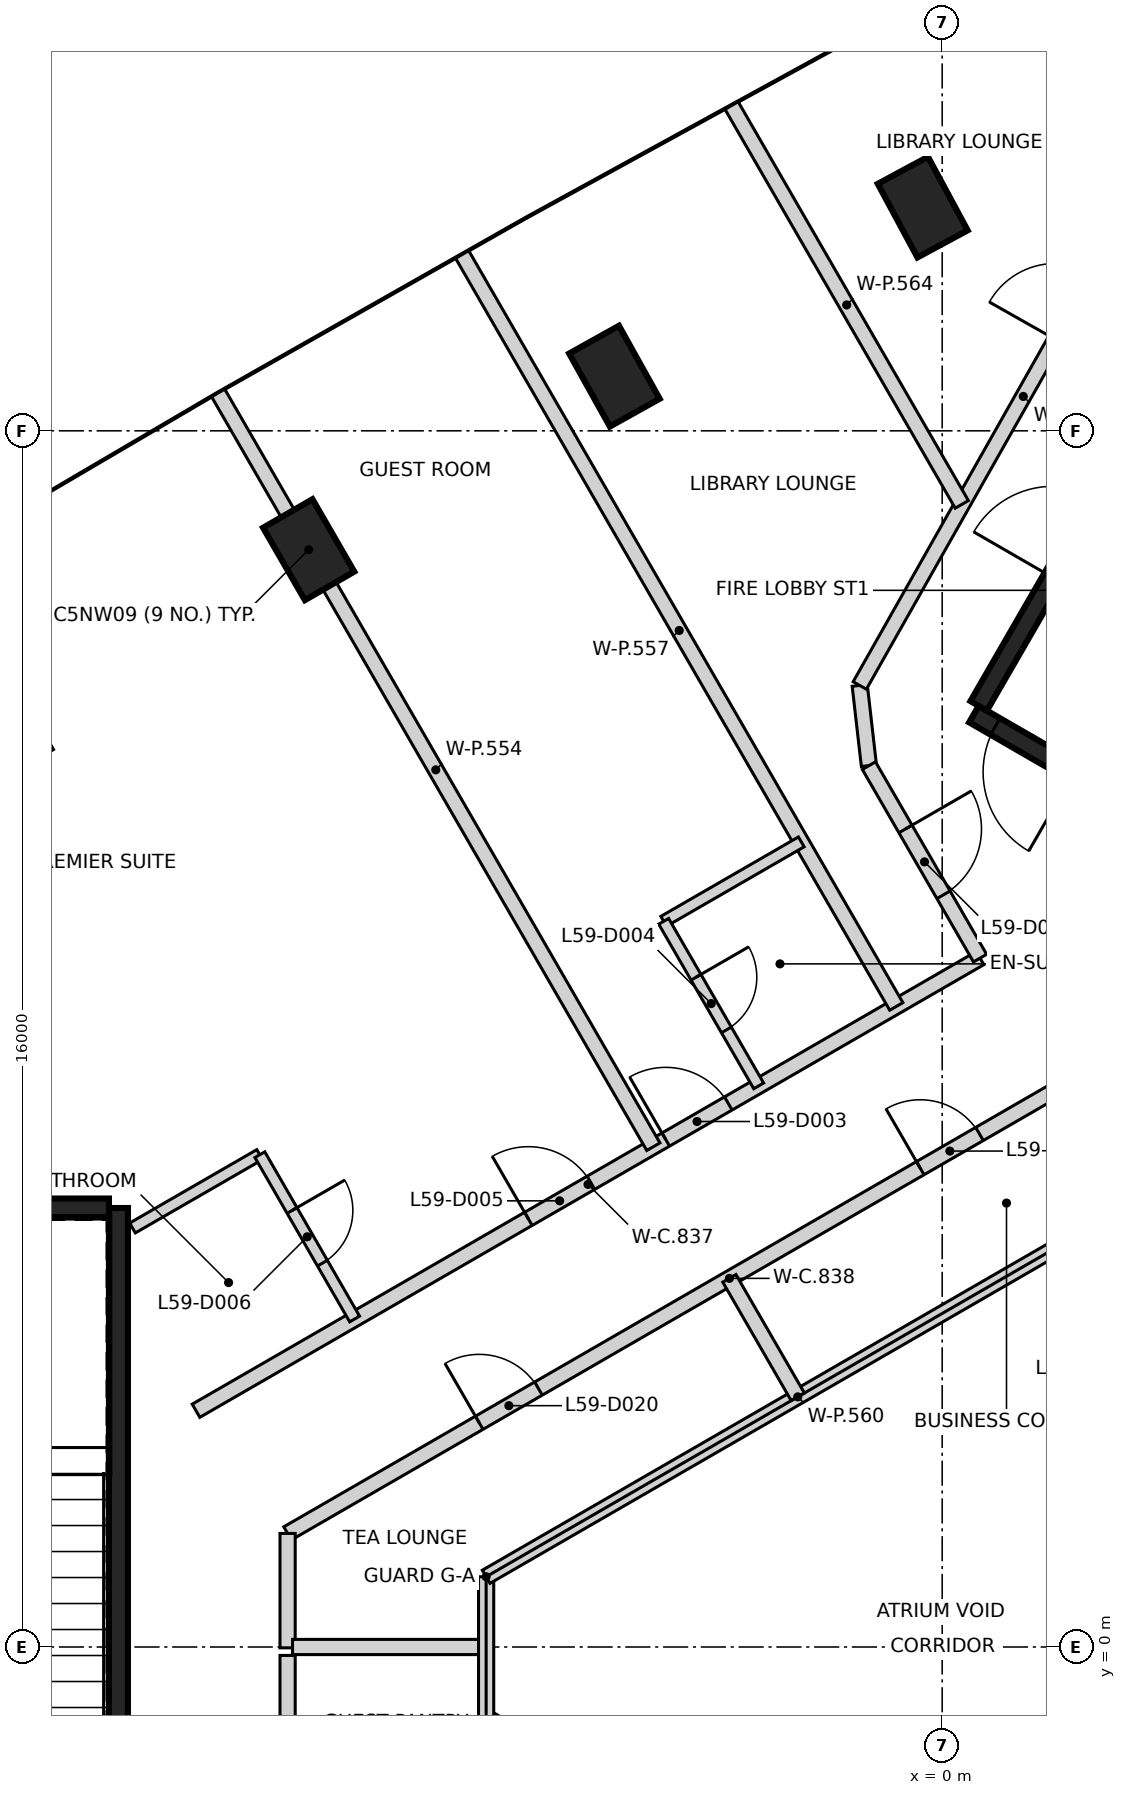
"""IFC4 building model, lengths in metres.
Left out: names, types, materials, properties, quantities, classifications, styles, units other than length and angle.
Written with IfcOpenShell. Run it as: python <this file> out.ifc"""

import sys

from ifc_helpers import new_model, si_unit, direction, frame, frame_2d, origin, origin_2d, place, context, subcontext, project, spatial, rectangle, extrude, element, fill, save


model = new_model("IFC4")
c1 = context("Model", 3, precision=1e-05, world=origin(), true_north=direction((0.0, 1.0)))
c2 = subcontext(c1, "Body", "Model", "MODEL_VIEW")
j1 = project(units=[si_unit("LENGTHUNIT", "METRE"), si_unit("PLANEANGLEUNIT", "RADIAN")], contexts=[c1])
p1 = place(None, origin())
s1 = spatial("IfcSite", under=j1, at=p1, CompositionType="ELEMENT")
p2 = place(p1, origin())
s2 = spatial("IfcBuilding", under=s1, at=p2, CompositionType="ELEMENT")
p3 = place(p2, frame((0.0, 0.0, 235.8)))
s3 = spatial("IfcBuildingStorey", under=s2, at=p3, CompositionType="ELEMENT", Elevation=235.8)
for number, where, z_axis, x_axis in (
    (1, (-0.256, 18.943, -0.35), (0.0, 0.0, 1.0), (-0.475, 0.88, 0.0)),
    (2, (-4.312, 16.719, -0.35), (0.0, 0.0, 1.0), (-0.487, 0.873, 0.0)),
    (3, (-8.335, 14.436, -0.35), (0.0, 0.0, 1.0), (-0.5, 0.866, 0.0)),
):
    element("IfcColumn", number, at=place(p3, frame(where, z_axis=z_axis, x_axis=x_axis)), inside=s3, PredefinedType="COLUMN", context=c2, shape_type="SweptSolid", body=[
        extrude(rectangle(XDim=1.1, YDim=0.75, at=origin_2d()), origin(), (0.0, 0.0, 1.0), 3.6),
    ])
p4 = place(p3, frame((-10.837, 5.775, 0.0), z_axis=(0.0, 0.0, 1.0), x_axis=(0.0, -1.0, 0.0)))
e4 = element("IfcWall", 4, at=p4, inside=s3, PredefinedType="SHEAR", context=c2, shape_type="SweptSolid", body=[
    extrude(rectangle(XDim=11.55, YDim=0.25, at=frame_2d((5.775, 0.0))), origin(), (0.0, 0.0, 1.0), 3.25),
])
p5 = place(p4, frame((10.025, 0.0, 0.0)))
e5 = element("IfcOpeningElement", 5, at=p5, cuts=e4, PredefinedType="OPENING", context=c2, shape_type="SweptSolid", body=[
    extrude(rectangle(XDim=1.2, YDim=2.1, at=frame_2d((0.6, 1.05))), frame((0.0, 0.135, 0.0), z_axis=(0.0, -1.0, 0.0), x_axis=(1.0, 0.0, 0.0)), (0.0, 0.0, 1.0), 0.27),
])
p6 = place(p4, frame((8.725, 0.0, 0.0)))
e6 = element("IfcOpeningElement", 6, at=p6, cuts=e4, PredefinedType="OPENING", context=c2, shape_type="SweptSolid", body=[
    extrude(rectangle(XDim=1.2, YDim=2.1, at=frame_2d((0.6, 1.05))), frame((0.0, 0.135, 0.0), z_axis=(0.0, -1.0, 0.0), x_axis=(1.0, 0.0, 0.0)), (0.0, 0.0, 1.0), 0.27),
])
p7 = place(p3, frame((-16.472, 5.775, 0.0), z_axis=(0.0, 0.0, 1.0), x_axis=(1.0, 0.0, 0.0)))
e7 = element("IfcWall", 7, at=p7, inside=s3, PredefinedType="SHEAR", context=c2, shape_type="SweptSolid", body=[
    extrude(rectangle(XDim=5.51, YDim=0.25, at=frame_2d((2.755, 0.0))), origin(), (0.0, 0.0, 1.0), 3.25),
])
p8 = place(p3, frame((10.42, 6.498, 0.0), z_axis=(0.0, 0.0, 1.0), x_axis=(-0.866021906294, 0.500006057782, 0.0)))
e8 = element("IfcWall", 8, at=p8, inside=s3, PredefinedType="SHEAR", context=c2, shape_type="SweptSolid", body=[
    extrude(rectangle(XDim=11.55, YDim=0.25, at=frame_2d((5.775, 0.0))), origin(), (0.0, 0.0, 1.0), 3.25),
])
p9 = place(p8, frame((10.025, 0.0, 0.0)))
e9 = element("IfcOpeningElement", 9, at=p9, cuts=e8, PredefinedType="OPENING", context=c2, shape_type="SweptSolid", body=[
    extrude(rectangle(XDim=1.2, YDim=2.1, at=frame_2d((0.6, 1.05))), frame((0.0, 0.135, 0.0), z_axis=(0.0, -1.0, 0.0), x_axis=(1.0, 0.0, 0.0)), (0.0, 0.0, 1.0), 0.27),
])
p10 = place(p8, frame((8.725, 0.0, 0.0)))
e10 = element("IfcOpeningElement", 10, at=p10, cuts=e8, PredefinedType="OPENING", context=c2, shape_type="SweptSolid", body=[
    extrude(rectangle(XDim=1.2, YDim=2.1, at=frame_2d((0.6, 1.05))), frame((0.0, 0.135, 0.0), z_axis=(0.0, -1.0, 0.0), x_axis=(1.0, 0.0, 0.0)), (0.0, 0.0, 1.0), 0.27),
])
p11 = place(p3, frame((0.48, 12.381, 0.0), z_axis=(0.0, 0.0, 1.0), x_axis=(0.49999885962, 0.866026062182, 0.0)))
e11 = element("IfcWall", 11, at=p11, inside=s3, PredefinedType="SHEAR", context=c2, shape_type="SweptSolid", body=[
    extrude(rectangle(XDim=5.225, YDim=0.25, at=frame_2d((2.612, 0.0))), origin(), (0.0, 0.0, 1.0), 3.25),
])
p12 = place(p11, frame((1.95, 0.0, 0.0)))
e12 = element("IfcOpeningElement", 12, at=p12, cuts=e11, PredefinedType="OPENING", context=c2, shape_type="SweptSolid", body=[
    extrude(rectangle(XDim=1.2, YDim=2.1, at=frame_2d((0.6, 1.05))), frame((0.0, 0.135, 0.0), z_axis=(0.0, -1.0, 0.0), x_axis=(1.0, 0.0, 0.0)), (0.0, 0.0, 1.0), 0.27),
])
p13 = place(p3, frame((-9.817, 3.108, 0.0), z_axis=(0.0, 0.0, 1.0), x_axis=(0.86603471326, 0.499983875168, 0.0)))
e13 = element("IfcWall", 13, at=p13, inside=s3, PredefinedType="PARTITIONING", context=c2, shape_type="SweptSolid", body=[
    extrude(rectangle(XDim=11.911, YDim=0.2, at=frame_2d((5.955, 0.0))), origin(), (0.0, 0.0, 1.0), 3.25),
])
p14 = place(p13, frame((7.136, 0.0, 0.0)))
e14 = element("IfcOpeningElement", 14, at=p14, cuts=e13, PredefinedType="OPENING", context=c2, shape_type="SweptSolid", body=[
    extrude(rectangle(XDim=0.95, YDim=2.1, at=frame_2d((0.475, 1.05))), frame((0.0, 0.11, 0.0), z_axis=(0.0, -1.0, 0.0), x_axis=(1.0, 0.0, 0.0)), (0.0, 0.0, 1.0), 0.22),
])
p15 = place(p13, frame((5.049, 0.0, 0.0)))
e15 = element("IfcOpeningElement", 15, at=p15, cuts=e13, PredefinedType="OPENING", context=c2, shape_type="SweptSolid", body=[
    extrude(rectangle(XDim=0.95, YDim=2.1, at=frame_2d((0.475, 1.05))), frame((0.0, 0.11, 0.0), z_axis=(0.0, -1.0, 0.0), x_axis=(1.0, 0.0, 0.0)), (0.0, 0.0, 1.0), 0.22),
])
p16 = place(p3, frame((-8.612, 1.494, 0.0), z_axis=(0.0, 0.0, 1.0), x_axis=(0.8660441356, 0.49996755414, 0.0)))
e16 = element("IfcWall", 16, at=p16, inside=s3, PredefinedType="PARTITIONING", context=c2, shape_type="SweptSolid", body=[
    extrude(rectangle(XDim=13.422, YDim=0.2, at=frame_2d((6.711, 0.0))), origin(), (0.0, 0.0, 1.0), 3.25),
])
p17 = place(p16, frame((9.611, 0.0, 0.0)))
e17 = element("IfcOpeningElement", 17, at=p17, cuts=e16, PredefinedType="OPENING", context=c2, shape_type="SweptSolid", body=[
    extrude(rectangle(XDim=0.9, YDim=2.1, at=frame_2d((0.45, 1.05))), frame((0.0, 0.11, 0.0), z_axis=(0.0, -1.0, 0.0), x_axis=(1.0, 0.0, 0.0)), (0.0, 0.0, 1.0), 0.22),
])
p18 = place(p16, frame((2.911, 0.0, 0.0)))
e18 = element("IfcOpeningElement", 18, at=p18, cuts=e16, PredefinedType="OPENING", context=c2, shape_type="SweptSolid", body=[
    extrude(rectangle(XDim=0.9, YDim=2.1, at=frame_2d((0.45, 1.05))), frame((0.0, 0.11, 0.0), z_axis=(0.0, -1.0, 0.0), x_axis=(1.0, 0.0, 0.0)), (0.0, 0.0, 1.0), 0.22),
])
p19 = place(p3, frame((-8.612, -1.494, 0.0), z_axis=(0.0, 0.0, 1.0), x_axis=(0.0, 1.0, 0.0)))
e19 = element("IfcWall", 19, at=p19, inside=s3, PredefinedType="PARTITIONING", context=c2, shape_type="SweptSolid", body=[
    extrude(rectangle(XDim=1.383, YDim=0.2, at=frame_2d((0.691, 0.0))), origin(), (0.0, 0.0, 1.0), 3.25),
])
p20 = place(p3, frame((-8.612, -0.011, 0.0), z_axis=(0.0, 0.0, 1.0), x_axis=(0.0, 1.0, 0.0)))
e20 = element("IfcWall", 20, at=p20, inside=s3, PredefinedType="PARTITIONING", context=c2, shape_type="SweptSolid", body=[
    extrude(rectangle(XDim=1.505, YDim=0.2, at=frame_2d((0.752, 0.0))), origin(), (0.0, 0.0, 1.0), 3.25),
])
p21 = place(p3, frame((-1.085, 12.65, 0.0), z_axis=(0.0, 0.0, 1.0), x_axis=(0.113812454263, -0.993502252264, 0.0)))
e21 = element("IfcWall", 21, at=p21, inside=s3, PredefinedType="PARTITIONING", context=c2, shape_type="SweptSolid", body=[
    extrude(rectangle(XDim=1.062, YDim=0.2, at=frame_2d((0.531, 0.0))), origin(), (0.0, 0.0, 1.0), 3.25),
])
p22 = place(p3, frame((-1.084, 12.65, 0.0), z_axis=(0.0, 0.0, 1.0), x_axis=(0.492373019537, 0.87038428848, 0.0)))
e22 = element("IfcWall", 22, at=p22, inside=s3, PredefinedType="PARTITIONING", context=c2, shape_type="SweptSolid", body=[
    extrude(rectangle(XDim=8.738, YDim=0.2, at=frame_2d((4.369, 0.0))), origin(), (0.0, 0.0, 1.0), 3.25),
])
p23 = place(p22, frame((5.23, 0.0, 0.0)))
e23 = element("IfcOpeningElement", 23, at=p23, cuts=e22, PredefinedType="OPENING", context=c2, shape_type="SweptSolid", body=[
    extrude(rectangle(XDim=1.0, YDim=2.1, at=frame_2d((0.5, 1.05))), frame((0.0, 0.11, 0.0), z_axis=(0.0, -1.0, 0.0), x_axis=(1.0, 0.0, 0.0)), (0.0, 0.0, 1.0), 0.22),
])
p24 = place(p3, frame((-0.964, 11.595, 0.0), z_axis=(0.0, 0.0, 1.0), x_axis=(0.500081432713, -0.865978383481, 0.0)))
e24 = element("IfcWall", 24, at=p24, inside=s3, PredefinedType="PARTITIONING", context=c2, shape_type="SweptSolid", body=[
    extrude(rectangle(XDim=2.924, YDim=0.2, at=frame_2d((1.462, 0.0))), origin(), (0.0, 0.0, 1.0), 3.25),
])
p25 = place(p24, frame((0.962, 0.0, 0.0)))
e25 = element("IfcOpeningElement", 25, at=p25, cuts=e24, PredefinedType="OPENING", context=c2, shape_type="SweptSolid", body=[
    extrude(rectangle(XDim=1.0, YDim=2.1, at=frame_2d((0.5, 1.05))), frame((0.0, 0.11, 0.0), z_axis=(0.0, -1.0, 0.0), x_axis=(1.0, 0.0, 0.0)), (0.0, 0.0, 1.0), 0.22),
])
p26 = place(p3, frame((-9.525, 16.498, 0.0), z_axis=(0.0, 0.0, 1.0), x_axis=(0.500030684965, -0.866007687087, 0.0)))
e26 = element("IfcWall", 26, at=p26, inside=s3, PredefinedType="PARTITIONING", context=c2, shape_type="SweptSolid", body=[
    extrude(rectangle(XDim=11.45, YDim=0.2, at=frame_2d((5.725, 0.0))), origin(), (0.0, 0.0, 1.0), 3.25),
])
p27 = place(p3, frame((-8.547, 0.0, 0.0), z_axis=(0.0, 0.0, 1.0), x_axis=(1.0, 0.0, 0.0)))
e27 = element("IfcWall", 27, at=p27, inside=s3, PredefinedType="PARTITIONING", context=c2, shape_type="SweptSolid", body=[
    extrude(rectangle(XDim=2.547, YDim=0.2, at=frame_2d((1.273, 0.0))), origin(), (0.0, 0.0, 1.0), 3.25),
])
p28 = place(p3, frame((-6.315, 18.32, 0.0), z_axis=(0.0, 0.0, 1.0), x_axis=(0.500012296027, -0.866018304553, 0.0)))
e28 = element("IfcWall", 28, at=p28, inside=s3, PredefinedType="PARTITIONING", context=c2, shape_type="SweptSolid", body=[
    extrude(rectangle(XDim=11.423, YDim=0.2, at=frame_2d((5.711, 0.0))), origin(), (0.0, 0.0, 1.0), 2.35),
])
p29 = place(p3, frame((-6.0, -0.924, 0.0), z_axis=(0.0, 0.0, 1.0), x_axis=(0.866223755075, -0.499656288007, 0.0)))
e29 = element("IfcWall", 29, at=p29, inside=s3, PredefinedType="PARTITIONING", context=c2, shape_type="SweptSolid", body=[
    extrude(rectangle(XDim=9.37, YDim=0.2, at=frame_2d((4.685, 0.0))), origin(), (0.0, 0.0, 1.0), 3.25),
])
p30 = place(p3, frame((-6.0, -0.924, 0.0), z_axis=(0.0, 0.0, 1.0), x_axis=(0.0, 1.0, 0.0)))
e30 = element("IfcWall", 30, at=p30, inside=s3, PredefinedType="PARTITIONING", context=c2, shape_type="SweptSolid", body=[
    extrude(rectangle(XDim=1.848, YDim=0.2, at=frame_2d((0.924, 0.0))), origin(), (0.0, 0.0, 1.0), 3.25),
])
p31 = place(p3, frame((-6.0, 0.924, 0.0), z_axis=(0.0, 0.0, 1.0), x_axis=(0.866012967051, 0.500021540435, 0.0)))
e31 = element("IfcWall", 31, at=p31, inside=s3, PredefinedType="PARTITIONING", context=c2, shape_type="SweptSolid", body=[
    extrude(rectangle(XDim=9.468, YDim=0.2, at=frame_2d((4.734, 0.0))), origin(), (0.0, 0.0, 1.0), 3.25),
])
p32 = place(p3, frame((-2.8, 4.85, 0.0), z_axis=(0.0, 0.0, 1.0), x_axis=(0.500004188491, -0.866022985545, 0.0)))
e32 = element("IfcWall", 32, at=p32, inside=s3, PredefinedType="PARTITIONING", context=c2, shape_type="SweptSolid", body=[
    extrude(rectangle(XDim=1.8, YDim=0.2, at=frame_2d((0.9, 0.0))), origin(), (0.0, 0.0, 1.0), 3.25),
])
p33 = place(p3, frame((-2.771, 20.279, 0.0), z_axis=(0.0, 0.0, 1.0), x_axis=(0.499939878606, -0.866060112105, 0.0)))
e33 = element("IfcWall", 33, at=p33, inside=s3, PredefinedType="PARTITIONING", context=c2, shape_type="SweptSolid", body=[
    extrude(rectangle(XDim=6.059, YDim=0.2, at=frame_2d((3.029, 0.0))), origin(), (0.0, 0.0, 1.0), 2.35),
])
p34 = place(p3, frame((-10.652, 5.512, 0.0), z_axis=(0.0, 0.0, 1.0), x_axis=(0.866017156151, 0.500014285048, 0.0)))
e34 = element("IfcWall", 34, at=p34, inside=s3, PredefinedType="PARTITIONING", context=c2, shape_type="SweptSolid", body=[
    extrude(rectangle(XDim=1.931, YDim=0.15, at=frame_2d((0.966, 0.0))), origin(), (0.0, 0.0, 1.0), 3.25),
])
p35 = place(p3, frame((-8.977, 6.477, 0.0), z_axis=(0.0, 0.0, 1.0), x_axis=(0.499632127845, -0.86623769072, 0.0)))
e35 = element("IfcWall", 35, at=p35, inside=s3, PredefinedType="PARTITIONING", context=c2, shape_type="SweptSolid", body=[
    extrude(rectangle(XDim=2.496, YDim=0.15, at=frame_2d((1.248, 0.0))), origin(), (0.0, 0.0, 1.0), 3.25),
])
p36 = place(p35, frame((0.847, 0.0, 0.0)))
e36 = element("IfcOpeningElement", 36, at=p36, cuts=e35, PredefinedType="OPENING", context=c2, shape_type="SweptSolid", body=[
    extrude(rectangle(XDim=0.8, YDim=2.1, at=frame_2d((0.4, 1.05))), frame((0.0, 0.085, 0.0), z_axis=(0.0, -1.0, 0.0), x_axis=(1.0, 0.0, 0.0)), (0.0, 0.0, 1.0), 0.17),
])
p37 = place(p3, frame((-3.664, 9.547, 0.0), z_axis=(0.0, 0.0, 1.0), x_axis=(0.866049423672, 0.499958394027, 0.0)))
e37 = element("IfcWall", 37, at=p37, inside=s3, PredefinedType="PARTITIONING", context=c2, shape_type="SweptSolid", body=[
    extrude(rectangle(XDim=2.09, YDim=0.15, at=frame_2d((1.045, 0.0))), origin(), (0.0, 0.0, 1.0), 3.25),
])
p38 = place(p3, frame((-3.664, 9.547, 0.0), z_axis=(0.0, 0.0, 1.0), x_axis=(0.500004234368, -0.866022959057, 0.0)))
e38 = element("IfcWall", 38, at=p38, inside=s3, PredefinedType="PARTITIONING", context=c2, shape_type="SweptSolid", body=[
    extrude(rectangle(XDim=2.5, YDim=0.15, at=frame_2d((1.25, 0.0))), origin(), (0.0, 0.0, 1.0), 3.25),
])
p39 = place(p38, frame((0.85, 0.0, 0.0)))
e39 = element("IfcOpeningElement", 39, at=p39, cuts=e38, PredefinedType="OPENING", context=c2, shape_type="SweptSolid", body=[
    extrude(rectangle(XDim=0.8, YDim=2.1, at=frame_2d((0.4, 1.05))), frame((0.0, 0.085, 0.0), z_axis=(0.0, -1.0, 0.0), x_axis=(1.0, 0.0, 0.0)), (0.0, 0.0, 1.0), 0.17),
])
p40 = place(p9, origin())
e40 = element("IfcDoor", 40, at=p40, inside=s3, OperationType="SINGLE_SWING_LEFT", PredefinedType="DOOR", context=c2, shape_type="SweptSolid", body=[
    extrude(rectangle(XDim=1.2, YDim=2.1, at=frame_2d((0.6, 1.05))), frame((0.0, 0.025, 0.0), z_axis=(0.0, -1.0, 0.0), x_axis=(1.0, 0.0, 0.0)), (0.0, 0.0, 1.0), 0.05),
])
fill(e9, e40)
p41 = place(p25, origin())
e41 = element("IfcDoor", 41, at=p41, inside=s3, OperationType="SINGLE_SWING_LEFT", PredefinedType="DOOR", context=c2, shape_type="SweptSolid", body=[
    extrude(rectangle(XDim=1.0, YDim=2.1, at=frame_2d((0.5, 1.05))), frame((0.0, 0.025, 0.0), z_axis=(0.0, -1.0, 0.0), x_axis=(1.0, 0.0, 0.0)), (0.0, 0.0, 1.0), 0.05),
])
fill(e25, e41)
p42 = place(p14, origin())
e42 = element("IfcDoor", 42, at=p42, inside=s3, OperationType="SINGLE_SWING_LEFT", PredefinedType="DOOR", context=c2, shape_type="SweptSolid", body=[
    extrude(rectangle(XDim=0.95, YDim=2.1, at=frame_2d((0.475, 1.05))), frame((0.0, 0.025, 0.0), z_axis=(0.0, -1.0, 0.0), x_axis=(1.0, 0.0, 0.0)), (0.0, 0.0, 1.0), 0.05),
])
fill(e14, e42)
p43 = place(p39, origin())
e43 = element("IfcDoor", 43, at=p43, inside=s3, OperationType="SINGLE_SWING_LEFT", PredefinedType="DOOR", context=c2, shape_type="SweptSolid", body=[
    extrude(rectangle(XDim=0.8, YDim=2.1, at=frame_2d((0.4, 1.05))), frame((0.0, 0.025, 0.0), z_axis=(0.0, -1.0, 0.0), x_axis=(1.0, 0.0, 0.0)), (0.0, 0.0, 1.0), 0.05),
])
fill(e39, e43)
p44 = place(p15, origin())
e44 = element("IfcDoor", 44, at=p44, inside=s3, OperationType="SINGLE_SWING_LEFT", PredefinedType="DOOR", context=c2, shape_type="SweptSolid", body=[
    extrude(rectangle(XDim=0.95, YDim=2.1, at=frame_2d((0.475, 1.05))), frame((0.0, 0.025, 0.0), z_axis=(0.0, -1.0, 0.0), x_axis=(1.0, 0.0, 0.0)), (0.0, 0.0, 1.0), 0.05),
])
fill(e15, e44)
p45 = place(p36, frame((0.8, 0.0, 0.0), z_axis=(0.0, 0.0, 1.0), x_axis=(-1.0, 0.0, 0.0)))
e45 = element("IfcDoor", 45, at=p45, inside=s3, OperationType="SINGLE_SWING_LEFT", PredefinedType="DOOR", context=c2, shape_type="SweptSolid", body=[
    extrude(rectangle(XDim=0.8, YDim=2.1, at=frame_2d((0.4, 1.05))), frame((0.0, 0.025, 0.0), z_axis=(0.0, -1.0, 0.0), x_axis=(1.0, 0.0, 0.0)), (0.0, 0.0, 1.0), 0.05),
])
fill(e36, e45)
p46 = place(p17, frame((0.9, 0.0, 0.0), z_axis=(0.0, 0.0, 1.0), x_axis=(-1.0, 0.0, 0.0)))
e46 = element("IfcDoor", 46, at=p46, inside=s3, OperationType="SINGLE_SWING_LEFT", PredefinedType="DOOR", context=c2, shape_type="SweptSolid", body=[
    extrude(rectangle(XDim=0.9, YDim=2.1, at=frame_2d((0.45, 1.05))), frame((0.0, 0.025, 0.0), z_axis=(0.0, -1.0, 0.0), x_axis=(1.0, 0.0, 0.0)), (0.0, 0.0, 1.0), 0.05),
])
fill(e17, e46)
p47 = place(p18, frame((0.9, 0.0, 0.0), z_axis=(0.0, 0.0, 1.0), x_axis=(-1.0, 0.0, 0.0)))
e47 = element("IfcDoor", 47, at=p47, inside=s3, OperationType="SINGLE_SWING_LEFT", PredefinedType="DOOR", context=c2, shape_type="SweptSolid", body=[
    extrude(rectangle(XDim=0.9, YDim=2.1, at=frame_2d((0.45, 1.05))), frame((0.0, 0.025, 0.0), z_axis=(0.0, -1.0, 0.0), x_axis=(1.0, 0.0, 0.0)), (0.0, 0.0, 1.0), 0.05),
])
fill(e18, e47)
save(model, sys.argv[1])
